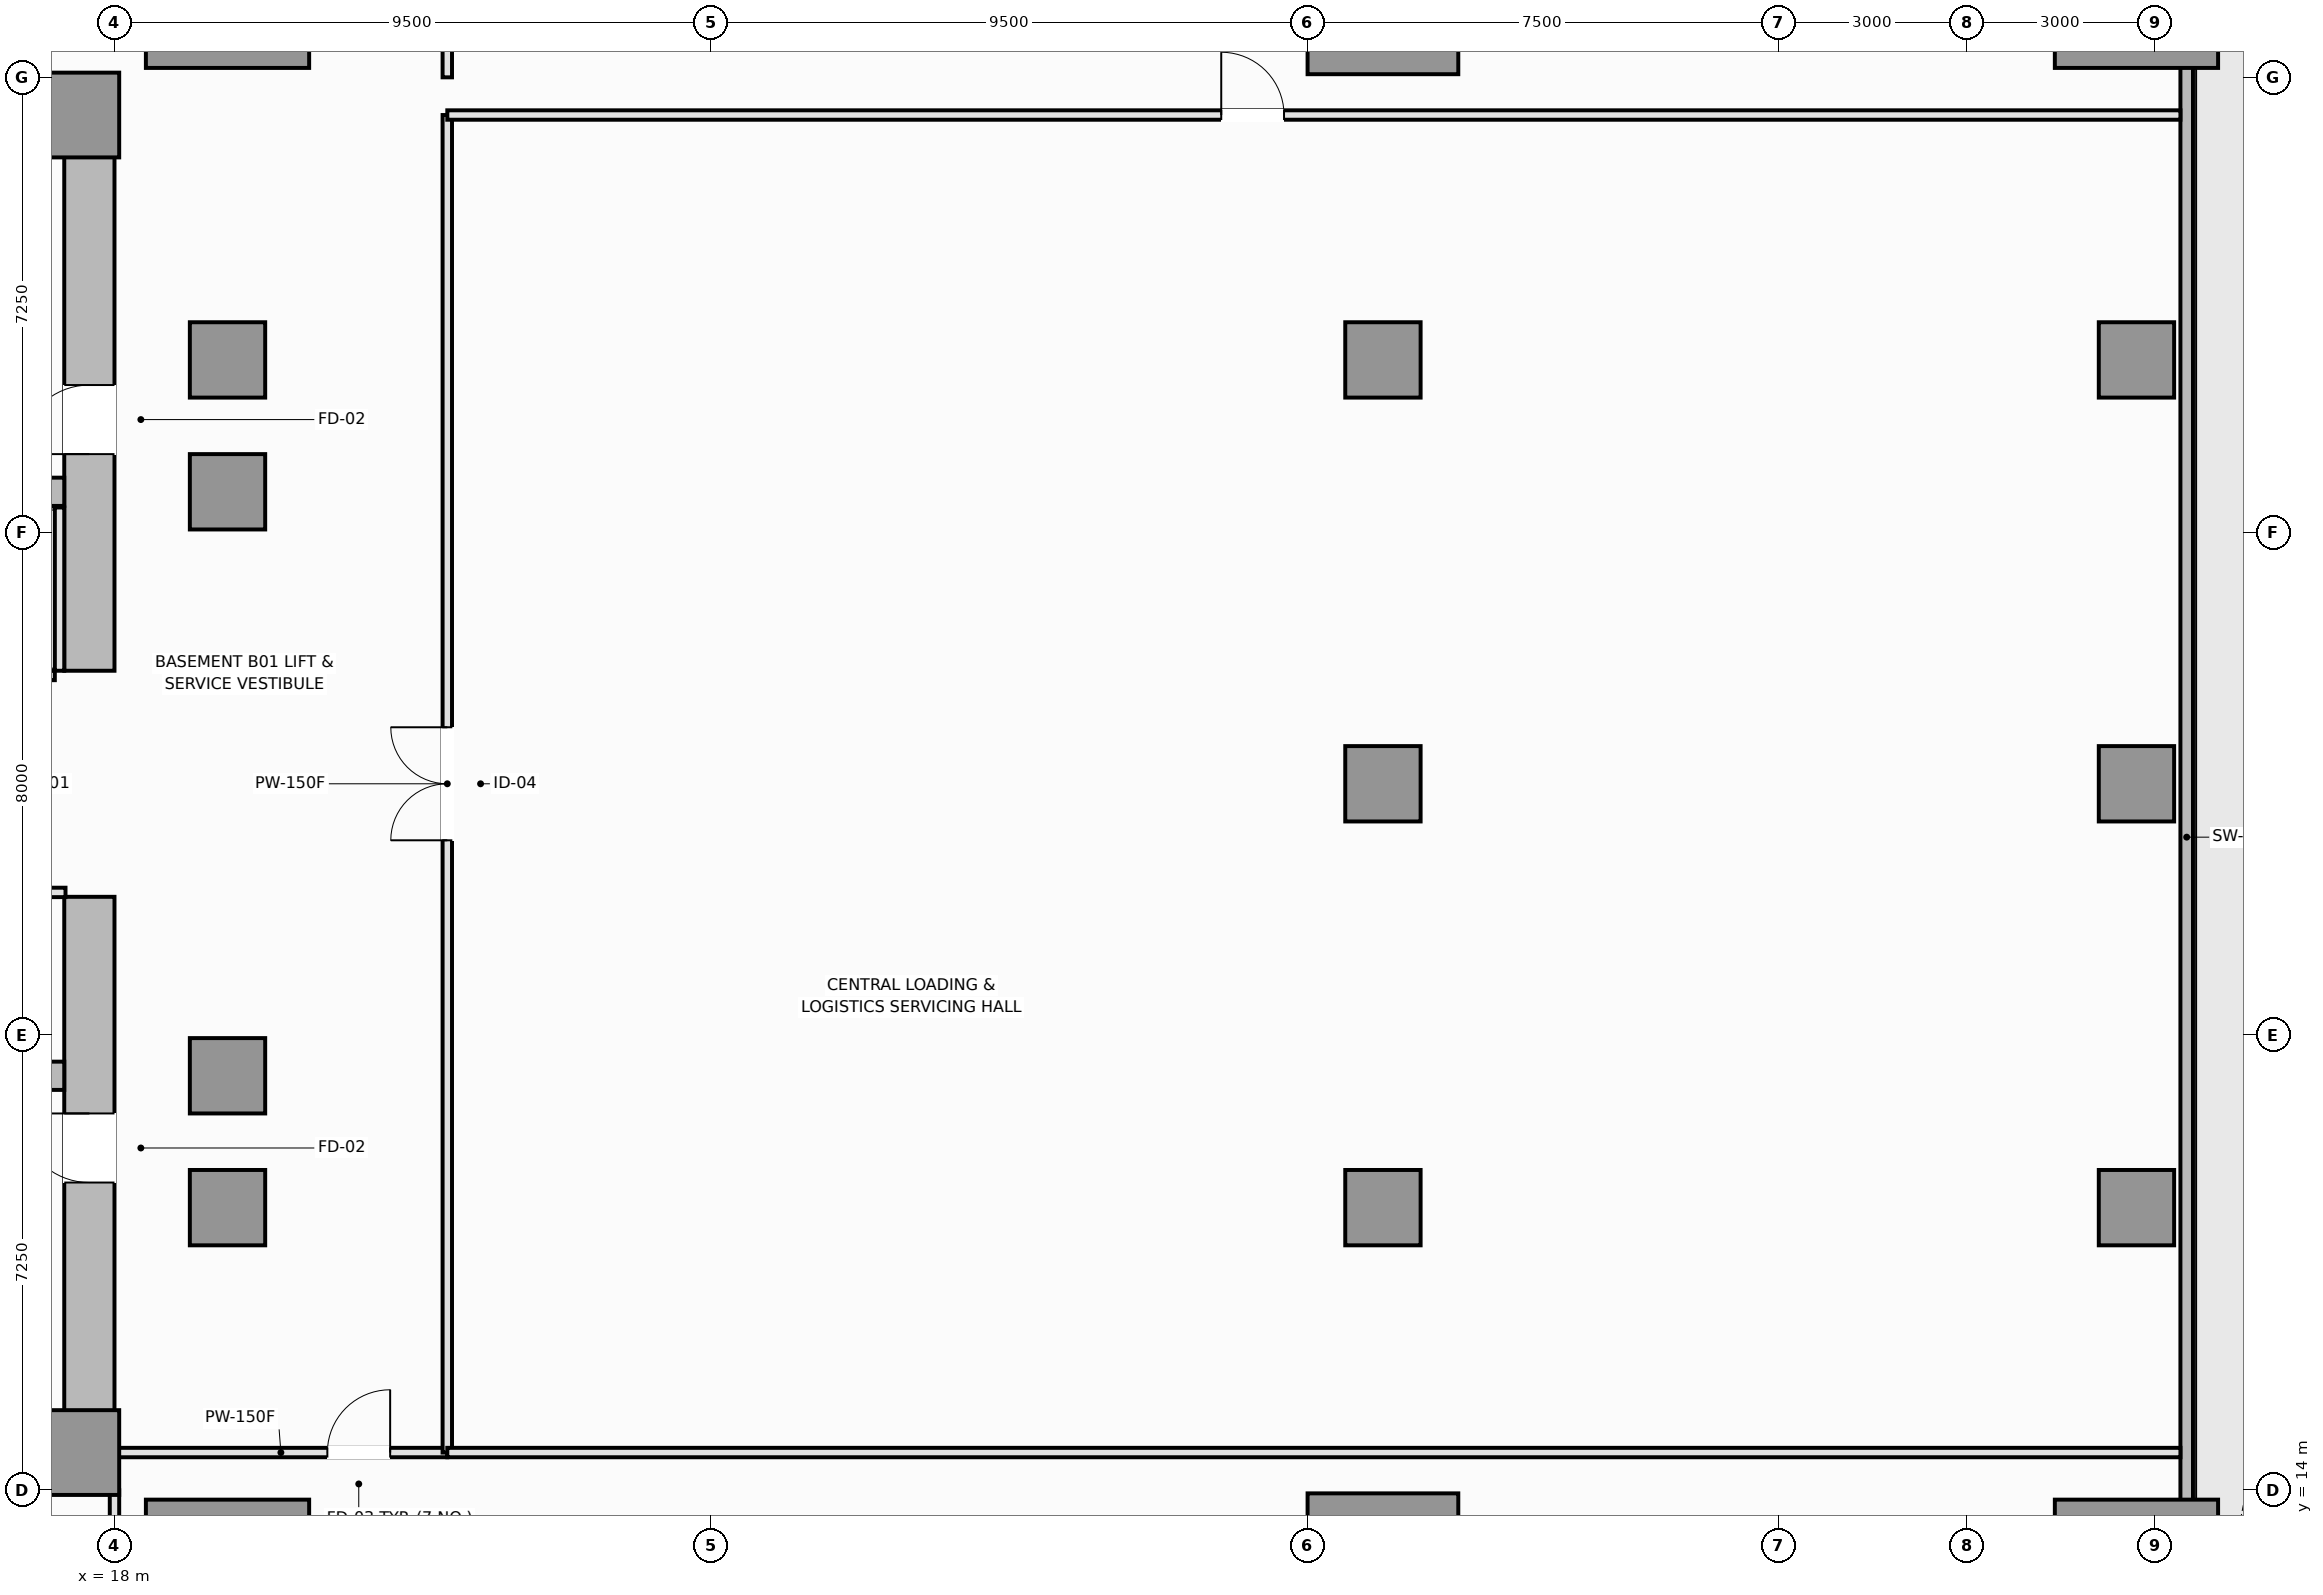
"""IFC4 building model, lengths in metres.
Left out: names, types, materials, properties, quantities, classifications, styles, units other than length and angle.
Written with IfcOpenShell. Run it as: python <this file> out.ifc"""

import sys

from ifc_helpers import new_model, si_unit, direction, frame, frame_2d, origin, origin_2d, place, context, subcontext, project, spatial, rectangle, extrude, element, fill, save


model = new_model("IFC4")
c1 = context("Model", 3, precision=1e-05, world=origin(), true_north=direction((0.0, 1.0)))
c2 = subcontext(c1, "Body", "Model", "MODEL_VIEW")
j1 = project(units=[si_unit("LENGTHUNIT", "METRE"), si_unit("PLANEANGLEUNIT", "RADIAN")], contexts=[c1])
p1 = place(None, origin())
s1 = spatial("IfcSite", under=j1, at=p1, CompositionType="ELEMENT")
p2 = place(p1, origin())
s2 = spatial("IfcBuilding", under=s1, at=p2, CompositionType="ELEMENT")
p3 = place(p2, frame((0.0, 0.0, -4.8)))
s3 = spatial("IfcBuildingStorey", under=s2, at=p3, CompositionType="ELEMENT", Elevation=-4.8)
for number, where, z_axis, x_axis in (
    (1, (4.5, 14.4, 0.0), (0.0, 0.0, 1.0), (1.0, 0.0, 0.0)),
    (2, (4.5, 36.1, 0.0), (0.0, 0.0, 1.0), (1.0, 0.0, 0.0)),
):
    element("IfcWall", number, at=place(p3, frame(where, z_axis=z_axis, x_axis=x_axis)), inside=s3, PredefinedType="SHEAR", context=c2, shape_type="SweptSolid", body=[
        extrude(rectangle(XDim=13.5, YDim=0.8, at=frame_2d((6.75, 0.0))), origin(), (0.0, 0.0, 1.0), 4.8),
    ])
p4 = place(p3, frame((17.6, 14.8, 0.0), z_axis=(0.0, 0.0, 1.0), x_axis=(0.0, 1.0, 0.0)))
e3 = element("IfcWall", 3, at=p4, inside=s3, PredefinedType="SHEAR", context=c2, shape_type="SweptSolid", body=[
    extrude(rectangle(XDim=8.65, YDim=0.8, at=frame_2d((4.325, 0.0))), origin(), (0.0, 0.0, 1.0), 4.8),
])
p5 = place(p4, frame((4.1, 0.0, 0.0)))
e4 = element("IfcOpeningElement", 4, at=p5, cuts=e3, PredefinedType="OPENING", context=c2, shape_type="SweptSolid", body=[
    extrude(rectangle(XDim=1.1, YDim=2.15, at=frame_2d((0.55, 1.075))), frame((0.0, 0.41, 0.0), z_axis=(0.0, -1.0, 0.0), x_axis=(1.0, 0.0, 0.0)), (0.0, 0.0, 1.0), 0.82),
])
p6 = place(p3, frame((17.6, 27.05, 0.0), z_axis=(0.0, 0.0, 1.0), x_axis=(0.0, 1.0, 0.0)))
e5 = element("IfcWall", 5, at=p6, inside=s3, PredefinedType="SHEAR", context=c2, shape_type="SweptSolid", body=[
    extrude(rectangle(XDim=8.65, YDim=0.8, at=frame_2d((4.325, 0.0))), origin(), (0.0, 0.0, 1.0), 4.8),
])
p7 = place(p6, frame((3.45, 0.0, 0.0)))
e6 = element("IfcOpeningElement", 6, at=p7, cuts=e5, PredefinedType="OPENING", context=c2, shape_type="SweptSolid", body=[
    extrude(rectangle(XDim=1.1, YDim=2.15, at=frame_2d((0.55, 1.075))), frame((0.0, 0.41, 0.0), z_axis=(0.0, -1.0, 0.0), x_axis=(1.0, 0.0, 0.0)), (0.0, 0.0, 1.0), 0.82),
])
for number, where, z_axis, x_axis in (
    (7, (5.3, 20.6, 0.0), (0.0, 0.0, 1.0), (1.0, 0.0, 0.0)),
    (8, (5.3, 29.9, 0.0), (0.0, 0.0, 1.0), (1.0, 0.0, 0.0)),
):
    element("IfcWall", number, at=place(p3, frame(where, z_axis=z_axis, x_axis=x_axis)), inside=s3, PredefinedType="SHEAR", context=c2, shape_type="SweptSolid", body=[
        extrude(rectangle(XDim=11.9, YDim=0.45, at=frame_2d((5.95, 0.0))), origin(), (0.0, 0.0, 1.0), 4.8),
    ])
for number, where, z_axis, x_axis in (
    (9, (17.4, 14.6, 0.0), (0.0, 0.0, 1.0), (1.0, 0.0, 0.0)),
    (10, (17.4, 35.9, 0.0), (0.0, 0.0, 1.0), (1.0, 0.0, 0.0)),
):
    element("IfcColumn", number, at=place(p3, frame(where, z_axis=z_axis, x_axis=x_axis)), inside=s3, PredefinedType="PILASTER", context=c2, shape_type="SweptSolid", body=[
        extrude(rectangle(XDim=1.35, YDim=1.35, at=origin_2d()), origin(), (0.0, 0.0, 1.0), 4.8),
    ])
for number, where, z_axis, x_axis in (
    (11, (38.2, 12.75, 0.0), (0.0, 0.0, 1.0), (1.0, 0.0, 0.0)),
    (12, (38.2, 37.75, 0.0), (0.0, 0.0, 1.0), (1.0, 0.0, 0.0)),
):
    element("IfcColumn", number, at=place(p3, frame(where, z_axis=z_axis, x_axis=x_axis)), inside=s3, PredefinedType="COLUMN", context=c2, shape_type="SweptSolid", body=[
        extrude(rectangle(XDim=2.4, YDim=2.4, at=origin_2d()), origin(), (0.0, 0.0, 1.0), 4.8),
    ])
for number, where, z_axis, x_axis in (
    (13, (38.2, 18.5, 0.0), (0.0, 0.0, 1.0), (1.0, 0.0, 0.0)),
    (14, (38.2, 25.25, 0.0), (0.0, 0.0, 1.0), (1.0, 0.0, 0.0)),
    (15, (38.2, 32.0, 0.0), (0.0, 0.0, 1.0), (1.0, 0.0, 0.0)),
):
    element("IfcColumn", number, at=place(p3, frame(where, z_axis=z_axis, x_axis=x_axis)), inside=s3, PredefinedType="COLUMN", context=c2, shape_type="SweptSolid", body=[
        extrude(rectangle(XDim=1.2, YDim=1.2, at=origin_2d()), origin(), (0.0, 0.0, 1.0), 4.8),
    ])
for number, where, z_axis, x_axis in (
    (16, (19.8, 12.75, 0.0), (0.0, 0.0, 1.0), (1.0, 0.0, 0.0)),
    (17, (50.2, 12.75, 0.0), (0.0, 0.0, 1.0), (1.0, 0.0, 0.0)),
    (18, (19.8, 37.75, 0.0), (0.0, 0.0, 1.0), (1.0, 0.0, 0.0)),
    (19, (50.2, 37.75, 0.0), (0.0, 0.0, 1.0), (1.0, 0.0, 0.0)),
):
    element("IfcColumn", number, at=place(p3, frame(where, z_axis=z_axis, x_axis=x_axis)), inside=s3, PredefinedType="COLUMN", context=c2, shape_type="SweptSolid", body=[
        extrude(rectangle(XDim=2.6, YDim=2.2, at=origin_2d()), origin(), (0.0, 0.0, 1.0), 4.8),
    ])
for number, where, z_axis, x_axis in (
    (20, (19.8, 18.5, 0.0), (0.0, 0.0, 1.0), (1.0, 0.0, 0.0)),
    (21, (19.8, 20.6, 0.0), (0.0, 0.0, 1.0), (1.0, 0.0, 0.0)),
    (22, (19.8, 29.9, 0.0), (0.0, 0.0, 1.0), (1.0, 0.0, 0.0)),
    (23, (19.8, 32.0, 0.0), (0.0, 0.0, 1.0), (1.0, 0.0, 0.0)),
    (24, (50.2, 18.5, 0.0), (0.0, 0.0, 1.0), (1.0, 0.0, 0.0)),
    (25, (50.2, 25.25, 0.0), (0.0, 0.0, 1.0), (1.0, 0.0, 0.0)),
    (26, (50.2, 32.0, 0.0), (0.0, 0.0, 1.0), (1.0, 0.0, 0.0)),
):
    element("IfcColumn", number, at=place(p3, frame(where, z_axis=z_axis, x_axis=x_axis)), inside=s3, PredefinedType="COLUMN", context=c2, shape_type="SweptSolid", body=[
        extrude(rectangle(XDim=1.2, YDim=1.2, at=origin_2d()), origin(), (0.0, 0.0, 1.0), 4.8),
    ])
p8 = place(p3, frame((14.5, 26.975, 0.0), z_axis=(0.0, 0.0, 1.0), x_axis=(1.0, 0.0, 0.0)))
e27 = element("IfcWall", 27, at=p8, inside=s3, PredefinedType="PARTITIONING", context=c2, shape_type="SweptSolid", body=[
    extrude(rectangle(XDim=2.55, YDim=0.15, at=frame_2d((1.275, 0.0))), origin(), (0.0, 0.0, 1.0), 4.6),
])
p9 = place(p8, frame((0.625, 0.0, 0.0)))
e28 = element("IfcOpeningElement", 28, at=p9, cuts=e27, PredefinedType="OPENING", context=c2, shape_type="SweptSolid", body=[
    extrude(rectangle(XDim=1.3, YDim=2.2, at=frame_2d((0.65, 1.1))), frame((0.0, 0.085, 0.0), z_axis=(0.0, -1.0, 0.0), x_axis=(1.0, 0.0, 0.0)), (0.0, 0.0, 1.0), 0.17),
])
p10 = place(p3, frame((17.125, 27.05, 0.0), z_axis=(0.0, 0.0, 1.0), x_axis=(0.0, 1.0, 0.0)))
e29 = element("IfcWall", 29, at=p10, inside=s3, PredefinedType="PARTITIONING", context=c2, shape_type="SweptSolid", body=[
    extrude(rectangle(XDim=2.6, YDim=0.15, at=frame_2d((1.3, 0.0))), origin(), (0.0, 0.0, 1.0), 4.6),
])
p11 = place(p3, frame((51.0, 9.9, 0.0), z_axis=(0.0, 0.0, 1.0), x_axis=(0.0, 1.0, 0.0)))
e30 = element("IfcWall", 30, at=p11, inside=s3, PredefinedType="SOLIDWALL", context=c2, shape_type="SweptSolid", body=[
    extrude(rectangle(XDim=29.0, YDim=0.2, at=frame_2d((14.5, 0.0))), origin(), (0.0, 0.0, 1.0), 4.8),
])
p12 = place(p3, frame((14.38, 23.52, 0.0), z_axis=(0.0, 0.0, 1.0), x_axis=(1.0, 0.0, 0.0)))
e31 = element("IfcWall", 31, at=p12, inside=s3, PredefinedType="PARTITIONING", context=c2, shape_type="SweptSolid", body=[
    extrude(rectangle(XDim=2.84, YDim=0.15, at=frame_2d((1.42, 0.0))), origin(), (0.0, 0.0, 1.0), 4.6),
])
p13 = place(p12, frame((0.28, 0.0, 0.0)))
e32 = element("IfcOpeningElement", 32, at=p13, cuts=e31, PredefinedType="OPENING", context=c2, shape_type="SweptSolid", body=[
    extrude(rectangle(XDim=0.9, YDim=2.1, at=frame_2d((0.45, 1.05))), frame((0.0, 0.085, 0.0), z_axis=(0.0, -1.0, 0.0), x_axis=(1.0, 0.0, 0.0)), (0.0, 0.0, 1.0), 0.17),
])
p14 = place(p12, frame((1.66, 0.0, 0.0)))
e33 = element("IfcOpeningElement", 33, at=p14, cuts=e31, PredefinedType="OPENING", context=c2, shape_type="SweptSolid", body=[
    extrude(rectangle(XDim=0.9, YDim=2.1, at=frame_2d((0.45, 1.05))), frame((0.0, 0.085, 0.0), z_axis=(0.0, -1.0, 0.0), x_axis=(1.0, 0.0, 0.0)), (0.0, 0.0, 1.0), 0.17),
])
p15 = place(p3, frame((18.0, 14.6, 0.0), z_axis=(0.0, 0.0, 1.0), x_axis=(1.0, 0.0, 0.0)))
e34 = element("IfcWall", 34, at=p15, inside=s3, PredefinedType="PARTITIONING", context=c2, shape_type="SweptSolid", body=[
    extrude(rectangle(XDim=5.3, YDim=0.15, at=frame_2d((2.65, 0.0))), origin(), (0.0, 0.0, 1.0), 4.6),
])
p16 = place(p15, frame((3.39, 0.0, 0.0)))
e35 = element("IfcOpeningElement", 35, at=p16, cuts=e34, PredefinedType="OPENING", context=c2, shape_type="SweptSolid", body=[
    extrude(rectangle(XDim=1.0, YDim=2.15, at=frame_2d((0.5, 1.075))), frame((0.0, 0.085, 0.0), z_axis=(0.0, -1.0, 0.0), x_axis=(1.0, 0.0, 0.0)), (0.0, 0.0, 1.0), 0.17),
])
p17 = place(p3, frame((23.3, 14.6, 0.0), z_axis=(0.0, 0.0, 1.0), x_axis=(0.0, 1.0, 0.0)))
e36 = element("IfcWall", 36, at=p17, inside=s3, PredefinedType="PARTITIONING", context=c2, shape_type="SweptSolid", body=[
    extrude(rectangle(XDim=21.3, YDim=0.15, at=frame_2d((10.65, 0.0))), origin(), (0.0, 0.0, 1.0), 4.6),
])
p18 = place(p17, frame((9.75, 0.0, 0.0)))
e37 = element("IfcOpeningElement", 37, at=p18, cuts=e36, PredefinedType="OPENING", context=c2, shape_type="SweptSolid", body=[
    extrude(rectangle(XDim=1.8, YDim=2.2, at=frame_2d((0.9, 1.1))), frame((0.0, 0.085, 0.0), z_axis=(0.0, -1.0, 0.0), x_axis=(1.0, 0.0, 0.0)), (0.0, 0.0, 1.0), 0.17),
])
p19 = place(p3, frame((18.0, 11.75, 0.0), z_axis=(0.0, 0.0, 1.0), x_axis=(0.0, 1.0, 0.0)))
e38 = element("IfcWall", 38, at=p19, inside=s3, PredefinedType="PARTITIONING", context=c2, shape_type="SweptSolid", body=[
    extrude(rectangle(XDim=2.25, YDim=0.15, at=frame_2d((1.125, 0.0))), origin(), (0.0, 0.0, 1.0), 4.6),
])
p20 = place(p3, frame((23.3, 36.5, 0.0), z_axis=(0.0, 0.0, 1.0), x_axis=(0.0, 1.0, 0.0)))
e39 = element("IfcWall", 39, at=p20, inside=s3, PredefinedType="PARTITIONING", context=c2, shape_type="SweptSolid", body=[
    extrude(rectangle(XDim=13.4, YDim=0.15, at=frame_2d((6.7, 0.0))), origin(), (0.0, 0.0, 1.0), 4.6),
])
p21 = place(p20, frame((6.2, 0.0, 0.0)))
e40 = element("IfcOpeningElement", 40, at=p21, cuts=e39, PredefinedType="OPENING", context=c2, shape_type="SweptSolid", body=[
    extrude(rectangle(XDim=1.0, YDim=2.15, at=frame_2d((0.5, 1.075))), frame((0.0, 0.085, 0.0), z_axis=(0.0, -1.0, 0.0), x_axis=(1.0, 0.0, 0.0)), (0.0, 0.0, 1.0), 0.17),
])
p22 = place(p3, frame((23.3, 14.6, 0.0), z_axis=(0.0, 0.0, 1.0), x_axis=(1.0, 0.0, 0.0)))
e41 = element("IfcWall", 41, at=p22, inside=s3, PredefinedType="PARTITIONING", context=c2, shape_type="SweptSolid", body=[
    extrude(rectangle(XDim=27.6, YDim=0.15, at=frame_2d((13.8, 0.0))), origin(), (0.0, 0.0, 1.0), 4.6),
])
p23 = place(p3, frame((23.3, 35.9, 0.0), z_axis=(0.0, 0.0, 1.0), x_axis=(1.0, 0.0, 0.0)))
e42 = element("IfcWall", 42, at=p23, inside=s3, PredefinedType="PARTITIONING", context=c2, shape_type="SweptSolid", body=[
    extrude(rectangle(XDim=27.6, YDim=0.15, at=frame_2d((13.8, 0.0))), origin(), (0.0, 0.0, 1.0), 4.6),
])
p24 = place(p23, frame((12.325, 0.0, 0.0)))
e43 = element("IfcOpeningElement", 43, at=p24, cuts=e42, PredefinedType="OPENING", context=c2, shape_type="SweptSolid", body=[
    extrude(rectangle(XDim=1.0, YDim=2.15, at=frame_2d((0.5, 1.075))), frame((0.0, 0.085, 0.0), z_axis=(0.0, -1.0, 0.0), x_axis=(1.0, 0.0, 0.0)), (0.0, 0.0, 1.0), 0.17),
])
p25 = place(p5, origin())
e44 = element("IfcDoor", 44, at=p25, inside=s3, OperationType="SINGLE_SWING_RIGHT", PredefinedType="DOOR", context=c2, shape_type="SweptSolid", body=[
    extrude(rectangle(XDim=1.1, YDim=2.15, at=frame_2d((0.55, 1.075))), frame((0.0, 0.025, 0.0), z_axis=(0.0, -1.0, 0.0), x_axis=(1.0, 0.0, 0.0)), (0.0, 0.0, 1.0), 0.05),
])
fill(e4, e44)
p26 = place(p7, origin())
e45 = element("IfcDoor", 45, at=p26, inside=s3, OperationType="SINGLE_SWING_LEFT", PredefinedType="DOOR", context=c2, shape_type="SweptSolid", body=[
    extrude(rectangle(XDim=1.1, YDim=2.15, at=frame_2d((0.55, 1.075))), frame((0.0, 0.025, 0.0), z_axis=(0.0, -1.0, 0.0), x_axis=(1.0, 0.0, 0.0)), (0.0, 0.0, 1.0), 0.05),
])
fill(e6, e45)
p27 = place(p16, origin())
e46 = element("IfcDoor", 46, at=p27, inside=s3, OperationType="SINGLE_SWING_RIGHT", PredefinedType="DOOR", context=c2, shape_type="SweptSolid", body=[
    extrude(rectangle(XDim=1.0, YDim=2.15, at=frame_2d((0.5, 1.075))), frame((0.0, 0.025, 0.0), z_axis=(0.0, -1.0, 0.0), x_axis=(1.0, 0.0, 0.0)), (0.0, 0.0, 1.0), 0.05),
])
fill(e35, e46)
p28 = place(p18, origin())
e47 = element("IfcDoor", 47, at=p28, inside=s3, OperationType="DOUBLE_DOOR_SINGLE_SWING", PredefinedType="DOOR", context=c2, shape_type="SweptSolid", body=[
    extrude(rectangle(XDim=1.8, YDim=2.2, at=frame_2d((0.9, 1.1))), frame((0.0, 0.025, 0.0), z_axis=(0.0, -1.0, 0.0), x_axis=(1.0, 0.0, 0.0)), (0.0, 0.0, 1.0), 0.05),
])
fill(e37, e47)
p29 = place(p24, origin())
e48 = element("IfcDoor", 48, at=p29, inside=s3, OperationType="SINGLE_SWING_LEFT", PredefinedType="DOOR", context=c2, shape_type="SweptSolid", body=[
    extrude(rectangle(XDim=1.0, YDim=2.15, at=frame_2d((0.5, 1.075))), frame((0.0, 0.025, 0.0), z_axis=(0.0, -1.0, 0.0), x_axis=(1.0, 0.0, 0.0)), (0.0, 0.0, 1.0), 0.05),
])
fill(e43, e48)
save(model, sys.argv[1])
